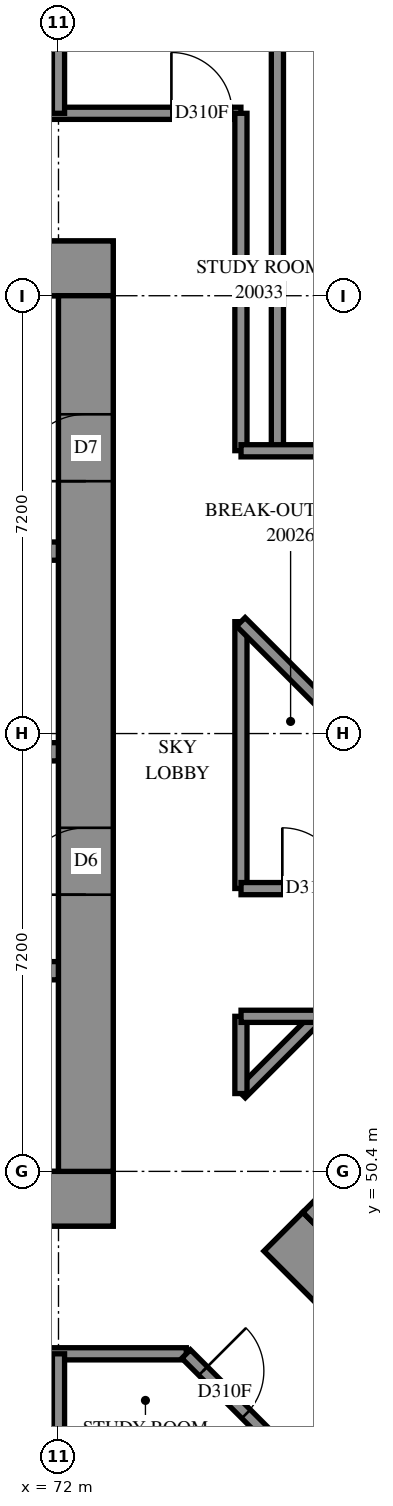
"""IFC4 building model, lengths in metres.
Left out: names, types, materials, properties, quantities, classifications, styles, units other than length and angle.
Written with IfcOpenShell. Run it as: python <this file> out.ifc"""

import sys

from ifc_helpers import new_model, si_unit, direction, frame, frame_2d, origin, place, context, subcontext, project, spatial, rectangle, extrude, element, fill, save


model = new_model("IFC4")
c1 = context("Model", 3, precision=1e-05, world=origin(), true_north=direction((0.0, 1.0)))
c2 = subcontext(c1, "Body", "Model", "MODEL_VIEW")
j1 = project(units=[si_unit("LENGTHUNIT", "METRE"), si_unit("PLANEANGLEUNIT", "RADIAN")], contexts=[c1])
p1 = place(None, origin())
s1 = spatial("IfcSite", under=j1, at=p1, CompositionType="ELEMENT")
p2 = place(p1, origin())
s2 = spatial("IfcBuilding", under=s1, at=p2, CompositionType="ELEMENT")
p3 = place(p2, frame((0.0, 0.0, 77.0)))
s3 = spatial("IfcBuildingStorey", under=s2, at=p3, CompositionType="ELEMENT", Elevation=77.0)
p4 = place(p3, frame((56.7, 49.95, -0.3), z_axis=(0.0, 0.0, 1.0), x_axis=(1.0, 0.0, 0.0)))
e1 = element("IfcWall", 1, at=p4, inside=s3, PredefinedType="SHEAR", context=c2, shape_type="SweptSolid", body=[
    extrude(rectangle(XDim=16.2, YDim=0.9, at=frame_2d((8.1, 0.0))), origin(), (0.0, 0.0, 1.0), 3.5),
])
p5 = place(p3, frame((56.7, 65.25, -0.3), z_axis=(0.0, 0.0, 1.0), x_axis=(1.0, 0.0, 0.0)))
e2 = element("IfcWall", 2, at=p5, inside=s3, PredefinedType="SHEAR", context=c2, shape_type="SweptSolid", body=[
    extrude(rectangle(XDim=16.2, YDim=0.9, at=frame_2d((8.1, 0.0))), origin(), (0.0, 0.0, 1.0), 3.5),
])
p6 = place(p5, frame((10.9, 0.0, 0.3)))
e3 = element("IfcOpeningElement", 3, at=p6, cuts=e2, PredefinedType="OPENING", context=c2, shape_type="SweptSolid", body=[
    extrude(rectangle(XDim=0.8, YDim=2.1, at=frame_2d((0.4, 1.05))), frame((0.0, 0.46, 0.0), z_axis=(0.0, -1.0, 0.0), x_axis=(1.0, 0.0, 0.0)), (0.0, 0.0, 1.0), 0.92),
])
p7 = place(p3, frame((72.45, 50.4, -0.3), z_axis=(0.0, 0.0, 1.0), x_axis=(0.0, 1.0, 0.0)))
e4 = element("IfcWall", 4, at=p7, inside=s3, PredefinedType="SHEAR", context=c2, shape_type="SweptSolid", body=[
    extrude(rectangle(XDim=14.4, YDim=0.9, at=frame_2d((7.2, 0.0))), origin(), (0.0, 0.0, 1.0), 3.5),
])
p8 = place(p7, frame((4.55, 0.0, 0.3)))
e5 = element("IfcOpeningElement", 5, at=p8, cuts=e4, PredefinedType="OPENING", context=c2, shape_type="SweptSolid", body=[
    extrude(rectangle(XDim=1.1, YDim=2.1, at=frame_2d((0.55, 1.05))), frame((0.0, 0.46, 0.0), z_axis=(0.0, -1.0, 0.0), x_axis=(1.0, 0.0, 0.0)), (0.0, 0.0, 1.0), 0.92),
])
p9 = place(p7, frame((11.35, 0.0, 0.3)))
e6 = element("IfcOpeningElement", 6, at=p9, cuts=e4, PredefinedType="OPENING", context=c2, shape_type="SweptSolid", body=[
    extrude(rectangle(XDim=1.1, YDim=2.1, at=frame_2d((0.55, 1.05))), frame((0.0, 0.46, 0.0), z_axis=(0.0, -1.0, 0.0), x_axis=(1.0, 0.0, 0.0)), (0.0, 0.0, 1.0), 0.92),
])
p10 = place(p3, frame((57.6, 53.7, 0.0), z_axis=(0.0, 0.0, 1.0), x_axis=(1.0, 0.0, 0.0)))
e7 = element("IfcWall", 7, at=p10, inside=s3, PredefinedType="SOLIDWALL", context=c2, shape_type="SweptSolid", body=[
    extrude(rectangle(XDim=14.4, YDim=0.3, at=frame_2d((7.2, 0.0))), origin(), (0.0, 0.0, 1.0), 3.9),
])
p11 = place(p10, frame((1.25, 0.0, 0.0)))
e8 = element("IfcOpeningElement", 8, at=p11, cuts=e7, PredefinedType="OPENING", context=c2, shape_type="SweptSolid", body=[
    extrude(rectangle(XDim=1.1, YDim=2.1, at=frame_2d((0.55, 1.05))), frame((0.0, 0.16, 0.0), z_axis=(0.0, -1.0, 0.0), x_axis=(1.0, 0.0, 0.0)), (0.0, 0.0, 1.0), 0.32),
])
p12 = place(p10, frame((4.85, 0.0, 0.0)))
e9 = element("IfcOpeningElement", 9, at=p12, cuts=e7, PredefinedType="OPENING", context=c2, shape_type="SweptSolid", body=[
    extrude(rectangle(XDim=1.1, YDim=2.1, at=frame_2d((0.55, 1.05))), frame((0.0, 0.16, 0.0), z_axis=(0.0, -1.0, 0.0), x_axis=(1.0, 0.0, 0.0)), (0.0, 0.0, 1.0), 0.32),
])
p13 = place(p10, frame((8.45, 0.0, 0.0)))
e10 = element("IfcOpeningElement", 10, at=p13, cuts=e7, PredefinedType="OPENING", context=c2, shape_type="SweptSolid", body=[
    extrude(rectangle(XDim=1.1, YDim=2.1, at=frame_2d((0.55, 1.05))), frame((0.0, 0.16, 0.0), z_axis=(0.0, -1.0, 0.0), x_axis=(1.0, 0.0, 0.0)), (0.0, 0.0, 1.0), 0.32),
])
p14 = place(p10, frame((12.05, 0.0, 0.0)))
e11 = element("IfcOpeningElement", 11, at=p14, cuts=e7, PredefinedType="OPENING", context=c2, shape_type="SweptSolid", body=[
    extrude(rectangle(XDim=1.1, YDim=2.1, at=frame_2d((0.55, 1.05))), frame((0.0, 0.16, 0.0), z_axis=(0.0, -1.0, 0.0), x_axis=(1.0, 0.0, 0.0)), (0.0, 0.0, 1.0), 0.32),
])
p15 = place(p3, frame((57.6, 57.3, 0.0), z_axis=(0.0, 0.0, 1.0), x_axis=(1.0, 0.0, 0.0)))
e12 = element("IfcWall", 12, at=p15, inside=s3, PredefinedType="SOLIDWALL", context=c2, shape_type="SweptSolid", body=[
    extrude(rectangle(XDim=14.4, YDim=0.3, at=frame_2d((7.2, 0.0))), origin(), (0.0, 0.0, 1.0), 3.9),
])
p16 = place(p15, frame((12.05, 0.0, 0.0)))
e13 = element("IfcOpeningElement", 13, at=p16, cuts=e12, PredefinedType="OPENING", context=c2, shape_type="SweptSolid", body=[
    extrude(rectangle(XDim=1.1, YDim=2.1, at=frame_2d((0.55, 1.05))), frame((0.0, 0.16, 0.0), z_axis=(0.0, -1.0, 0.0), x_axis=(1.0, 0.0, 0.0)), (0.0, 0.0, 1.0), 0.32),
])
p17 = place(p3, frame((64.8, 60.6, 0.0), z_axis=(0.0, 0.0, 1.0), x_axis=(1.0, 0.0, 0.0)))
e14 = element("IfcWall", 14, at=p17, inside=s3, PredefinedType="SOLIDWALL", context=c2, shape_type="SweptSolid", body=[
    extrude(rectangle(XDim=7.2, YDim=0.3, at=frame_2d((3.6, 0.0))), origin(), (0.0, 0.0, 1.0), 3.9),
])
p18 = place(p3, frame((75.7, 49.408, -0.3), z_axis=(0.0, 0.0, 1.0), x_axis=(0.7071098676, -0.7071036948, 0.0)))
e15 = element("IfcWall", 15, at=p18, inside=s3, PredefinedType="SHEAR", context=c2, shape_type="SweptSolid", body=[
    extrude(rectangle(XDim=16.2, YDim=0.9, at=frame_2d((8.1, 0.0))), origin(), (0.0, 0.0, 1.0), 3.5),
])
p19 = place(p3, frame((76.336, 49.408, -0.3), z_axis=(0.0, 0.0, 1.0), x_axis=(0.7071067812, 0.7071067812, 0.0)))
e16 = element("IfcWall", 16, at=p19, inside=s3, PredefinedType="SHEAR", context=c2, shape_type="SweptSolid", body=[
    extrude(rectangle(XDim=14.4, YDim=0.9, at=frame_2d((7.2, 0.0))), origin(), (0.0, 0.0, 1.0), 3.5),
])
p20 = place(p19, frame((4.55, 0.0, 0.3)))
e17 = element("IfcOpeningElement", 17, at=p20, cuts=e16, PredefinedType="OPENING", context=c2, shape_type="SweptSolid", body=[
    extrude(rectangle(XDim=1.1, YDim=2.1, at=frame_2d((0.55, 1.05))), frame((0.0, 0.46, 0.0), z_axis=(0.0, -1.0, 0.0), x_axis=(1.0, 0.0, 0.0)), (0.0, 0.0, 1.0), 0.92),
])
p21 = place(p19, frame((11.35, 0.0, 0.3)))
e18 = element("IfcOpeningElement", 18, at=p21, cuts=e16, PredefinedType="OPENING", context=c2, shape_type="SweptSolid", body=[
    extrude(rectangle(XDim=1.1, YDim=2.1, at=frame_2d((0.55, 1.05))), frame((0.0, 0.46, 0.0), z_axis=(0.0, -1.0, 0.0), x_axis=(1.0, 0.0, 0.0)), (0.0, 0.0, 1.0), 0.92),
])
p22 = place(p3, frame((79.28, 68.48, 0.0), z_axis=(0.0, 0.0, 1.0), x_axis=(-0.9122884657, 0.4095482333, 0.0)))
e19 = element("IfcWall", 19, at=p22, inside=s3, PredefinedType="SOLIDWALL", context=c2, shape_type="SweptSolid", body=[
    extrude(rectangle(XDim=3.464, YDim=0.8, at=frame_2d((1.732, 0.0))), origin(), (0.0, 0.0, 1.0), 0.65),
])
p23 = place(p3, frame((54.6, 67.8, 0.0), z_axis=(0.0, 0.0, 1.0), x_axis=(1.0, 0.0, 0.0)))
e20 = element("IfcWall", 20, at=p23, inside=s3, PredefinedType="PARTITIONING", context=c2, shape_type="SweptSolid", body=[
    extrude(rectangle(XDim=20.4, YDim=0.2, at=frame_2d((10.2, 0.0))), origin(), (0.0, 0.0, 1.0), 3.9),
])
p24 = place(p23, frame((19.257, 0.0, 0.0)))
e21 = element("IfcOpeningElement", 21, at=p24, cuts=e20, PredefinedType="OPENING", context=c2, shape_type="SweptSolid", body=[
    extrude(rectangle(XDim=1.0, YDim=2.1, at=frame_2d((0.5, 1.05))), frame((0.0, 0.11, 0.0), z_axis=(0.0, -1.0, 0.0), x_axis=(1.0, 0.0, 0.0)), (0.0, 0.0, 1.0), 0.22),
])
p25 = place(p23, frame((5.093, 0.0, 0.0)))
e22 = element("IfcOpeningElement", 22, at=p25, cuts=e20, PredefinedType="OPENING", context=c2, shape_type="SweptSolid", body=[
    extrude(rectangle(XDim=1.0, YDim=2.1, at=frame_2d((0.5, 1.05))), frame((0.0, 0.11, 0.0), z_axis=(0.0, -1.0, 0.0), x_axis=(1.0, 0.0, 0.0)), (0.0, 0.0, 1.0), 0.22),
])
p26 = place(p23, frame((7.168, 0.0, 0.0)))
e23 = element("IfcOpeningElement", 23, at=p26, cuts=e20, PredefinedType="OPENING", context=c2, shape_type="SweptSolid", body=[
    extrude(rectangle(XDim=1.0, YDim=2.1, at=frame_2d((0.5, 1.05))), frame((0.0, 0.11, 0.0), z_axis=(0.0, -1.0, 0.0), x_axis=(1.0, 0.0, 0.0)), (0.0, 0.0, 1.0), 0.22),
])
p27 = place(p23, frame((12.293, 0.0, 0.0)))
e24 = element("IfcOpeningElement", 24, at=p27, cuts=e20, PredefinedType="OPENING", context=c2, shape_type="SweptSolid", body=[
    extrude(rectangle(XDim=1.0, YDim=2.1, at=frame_2d((0.5, 1.05))), frame((0.0, 0.11, 0.0), z_axis=(0.0, -1.0, 0.0), x_axis=(1.0, 0.0, 0.0)), (0.0, 0.0, 1.0), 0.22),
])
p28 = place(p23, frame((14.367, 0.0, 0.0)))
e25 = element("IfcOpeningElement", 25, at=p28, cuts=e20, PredefinedType="OPENING", context=c2, shape_type="SweptSolid", body=[
    extrude(rectangle(XDim=1.0, YDim=2.1, at=frame_2d((0.5, 1.05))), frame((0.0, 0.11, 0.0), z_axis=(0.0, -1.0, 0.0), x_axis=(1.0, 0.0, 0.0)), (0.0, 0.0, 1.0), 0.22),
])
p29 = place(p3, frame((54.6, 47.4, 0.0), z_axis=(0.0, 0.0, 1.0), x_axis=(1.0, 0.0, 0.0)))
e26 = element("IfcWall", 26, at=p29, inside=s3, PredefinedType="PARTITIONING", context=c2, shape_type="SweptSolid", body=[
    extrude(rectangle(XDim=19.502, YDim=0.2, at=frame_2d((9.751, 0.0))), origin(), (0.0, 0.0, 1.0), 3.9),
])
p30 = place(p29, frame((5.032, 0.0, 0.0)))
e27 = element("IfcOpeningElement", 27, at=p30, cuts=e26, PredefinedType="OPENING", context=c2, shape_type="SweptSolid", body=[
    extrude(rectangle(XDim=1.0, YDim=2.1, at=frame_2d((0.5, 1.05))), frame((0.0, 0.11, 0.0), z_axis=(0.0, -1.0, 0.0), x_axis=(1.0, 0.0, 0.0)), (0.0, 0.0, 1.0), 0.22),
])
p31 = place(p29, frame((7.107, 0.0, 0.0)))
e28 = element("IfcOpeningElement", 28, at=p31, cuts=e26, PredefinedType="OPENING", context=c2, shape_type="SweptSolid", body=[
    extrude(rectangle(XDim=1.0, YDim=2.1, at=frame_2d((0.5, 1.05))), frame((0.0, 0.11, 0.0), z_axis=(0.0, -1.0, 0.0), x_axis=(1.0, 0.0, 0.0)), (0.0, 0.0, 1.0), 0.22),
])
p32 = place(p29, frame((12.232, 0.0, 0.0)))
e29 = element("IfcOpeningElement", 29, at=p32, cuts=e26, PredefinedType="OPENING", context=c2, shape_type="SweptSolid", body=[
    extrude(rectangle(XDim=1.0, YDim=2.1, at=frame_2d((0.5, 1.05))), frame((0.0, 0.11, 0.0), z_axis=(0.0, -1.0, 0.0), x_axis=(1.0, 0.0, 0.0)), (0.0, 0.0, 1.0), 0.22),
])
p33 = place(p29, frame((14.307, 0.0, 0.0)))
e30 = element("IfcOpeningElement", 30, at=p33, cuts=e26, PredefinedType="OPENING", context=c2, shape_type="SweptSolid", body=[
    extrude(rectangle(XDim=1.0, YDim=2.1, at=frame_2d((0.5, 1.05))), frame((0.0, 0.11, 0.0), z_axis=(0.0, -1.0, 0.0), x_axis=(1.0, 0.0, 0.0)), (0.0, 0.0, 1.0), 0.22),
])
p34 = place(p3, frame((75.6, 62.25, 0.0), z_axis=(0.0, 0.0, 1.0), x_axis=(0.0, 1.0, 0.0)))
e31 = element("IfcWall", 31, at=p34, inside=s3, PredefinedType="PARTITIONING", context=c2, shape_type="SweptSolid", body=[
    extrude(rectangle(XDim=8.42, YDim=0.2, at=frame_2d((4.21, 0.0))), origin(), (0.0, 0.0, 1.0), 3.9),
])
p35 = place(p3, frame((75.0, 62.252, 0.0), z_axis=(0.0, 0.0, 1.0), x_axis=(0.0, 1.0, 0.0)))
e32 = element("IfcWall", 32, at=p35, inside=s3, PredefinedType="PARTITIONING", context=c2, shape_type="SweptSolid", body=[
    extrude(rectangle(XDim=5.548, YDim=0.2, at=frame_2d((2.774, 0.0))), origin(), (0.0, 0.0, 1.0), 3.9),
])
p36 = place(p3, frame((75.0, 55.052, 0.0), z_axis=(0.0, 0.0, 1.0), x_axis=(0.0, 1.0, 0.0)))
e33 = element("IfcWall", 33, at=p36, inside=s3, PredefinedType="PARTITIONING", context=c2, shape_type="SweptSolid", body=[
    extrude(rectangle(XDim=4.388, YDim=0.2, at=frame_2d((2.194, 0.0))), origin(), (0.0, 0.0, 1.0), 3.9),
])
p37 = place(p3, frame((75.002, 62.25, 0.0), z_axis=(0.0, 0.0, 1.0), x_axis=(1.0, 0.0, 0.0)))
e34 = element("IfcWall", 34, at=p37, inside=s3, PredefinedType="PARTITIONING", context=c2, shape_type="SweptSolid", body=[
    extrude(rectangle(XDim=4.198, YDim=0.2, at=frame_2d((2.099, 0.0))), origin(), (0.0, 0.0, 1.0), 3.9),
])
p38 = place(p3, frame((74.099, 47.397, 0.0), z_axis=(0.0, 0.0, 1.0), x_axis=(0.7071067812, -0.7071067812, 0.0)))
e35 = element("IfcWall", 35, at=p38, inside=s3, PredefinedType="PARTITIONING", context=c2, shape_type="SweptSolid", body=[
    extrude(rectangle(XDim=4.059, YDim=0.2, at=frame_2d((2.029, 0.0))), origin(), (0.0, 0.0, 1.0), 3.9),
])
p39 = place(p38, frame((0.395, 0.0, 0.0)))
e36 = element("IfcOpeningElement", 36, at=p39, cuts=e35, PredefinedType="OPENING", context=c2, shape_type="SweptSolid", body=[
    extrude(rectangle(XDim=1.0, YDim=2.1, at=frame_2d((0.5, 1.05))), frame((0.0, 0.11, 0.0), z_axis=(0.0, -1.0, 0.0), x_axis=(1.0, 0.0, 0.0)), (0.0, 0.0, 1.0), 0.22),
])
p40 = place(p3, frame((75.002, 55.05, 0.0), z_axis=(0.0, 0.0, 1.0), x_axis=(1.0, 0.0, 0.0)))
e37 = element("IfcWall", 37, at=p40, inside=s3, PredefinedType="PARTITIONING", context=c2, shape_type="SweptSolid", body=[
    extrude(rectangle(XDim=3.37, YDim=0.2, at=frame_2d((1.685, 0.0))), origin(), (0.0, 0.0, 1.0), 3.9),
])
p41 = place(p40, frame((0.679, 0.0, 0.0)))
e38 = element("IfcOpeningElement", 38, at=p41, cuts=e37, PredefinedType="OPENING", context=c2, shape_type="SweptSolid", body=[
    extrude(rectangle(XDim=1.0, YDim=2.1, at=frame_2d((0.5, 1.05))), frame((0.0, 0.11, 0.0), z_axis=(0.0, -1.0, 0.0), x_axis=(1.0, 0.0, 0.0)), (0.0, 0.0, 1.0), 0.22),
])
p42 = place(p3, frame((74.999, 59.437, 0.0), z_axis=(0.0, 0.0, 1.0), x_axis=(0.7071067812, -0.7071067812, 0.0)))
e39 = element("IfcWall", 39, at=p42, inside=s3, PredefinedType="PARTITIONING", context=c2, shape_type="SweptSolid", body=[
    extrude(rectangle(XDim=3.321, YDim=0.2, at=frame_2d((1.66, 0.0))), origin(), (0.0, 0.0, 1.0), 3.9),
])
for number, where, z_axis, x_axis in (
    (40, (72.0, 67.8, 0.0), (0.0, 0.0, 1.0), (0.0, 1.0, 0.0)),
    (41, (72.0, 44.53, 0.0), (0.0, 0.0, 1.0), (0.0, 1.0, 0.0)),
):
    element("IfcWall", number, at=place(p3, frame(where, z_axis=z_axis, x_axis=x_axis)), inside=s3, PredefinedType="PARTITIONING", context=c2, shape_type="SweptSolid", body=[
        extrude(rectangle(XDim=2.87, YDim=0.2, at=frame_2d((1.435, 0.0))), origin(), (0.0, 0.0, 1.0), 3.9),
    ])
p43 = place(p3, frame((75.001, 51.681, 0.0), z_axis=(0.0, 0.0, 1.0), x_axis=(0.7071067812, 0.7071067812, 0.0)))
e42 = element("IfcWall", 42, at=p43, inside=s3, PredefinedType="PARTITIONING", context=c2, shape_type="SweptSolid", body=[
    extrude(rectangle(XDim=1.793, YDim=0.2, at=frame_2d((0.897, 0.0))), origin(), (0.0, 0.0, 1.0), 3.9),
])
p44 = place(p3, frame((75.0, 51.68, 0.0), z_axis=(0.0, 0.0, 1.0), x_axis=(0.0, 1.0, 0.0)))
e43 = element("IfcWall", 43, at=p44, inside=s3, PredefinedType="PARTITIONING", context=c2, shape_type="SweptSolid", body=[
    extrude(rectangle(XDim=1.27, YDim=0.2, at=frame_2d((0.635, 0.0))), origin(), (0.0, 0.0, 1.0), 3.9),
])
p45 = place(p3, frame((75.002, 52.95, 0.0), z_axis=(0.0, 0.0, 1.0), x_axis=(1.0, 0.0, 0.0)))
e44 = element("IfcWall", 44, at=p45, inside=s3, PredefinedType="PARTITIONING", context=c2, shape_type="SweptSolid", body=[
    extrude(rectangle(XDim=1.268, YDim=0.2, at=frame_2d((0.634, 0.0))), origin(), (0.0, 0.0, 1.0), 3.9),
])
p46 = place(p8, origin())
e45 = element("IfcDoor", 45, at=p46, inside=s3, OperationType="DOUBLE_DOOR_SINGLE_SWING", PredefinedType="DOOR", context=c2, shape_type="SweptSolid", body=[
    extrude(rectangle(XDim=1.1, YDim=2.1, at=frame_2d((0.55, 1.05))), frame((0.0, 0.025, 0.0), z_axis=(0.0, -1.0, 0.0), x_axis=(1.0, 0.0, 0.0)), (0.0, 0.0, 1.0), 0.05),
])
fill(e5, e45)
p47 = place(p9, origin())
e46 = element("IfcDoor", 46, at=p47, inside=s3, OperationType="SINGLE_SWING_RIGHT", PredefinedType="DOOR", context=c2, shape_type="SweptSolid", body=[
    extrude(rectangle(XDim=1.1, YDim=2.1, at=frame_2d((0.55, 1.05))), frame((0.0, 0.025, 0.0), z_axis=(0.0, -1.0, 0.0), x_axis=(1.0, 0.0, 0.0)), (0.0, 0.0, 1.0), 0.05),
])
fill(e6, e46)
p48 = place(p39, origin())
e47 = element("IfcDoor", 47, at=p48, inside=s3, OperationType="SINGLE_SWING_LEFT", PredefinedType="DOOR", context=c2, shape_type="SweptSolid", body=[
    extrude(rectangle(XDim=1.0, YDim=2.1, at=frame_2d((0.5, 1.05))), frame((0.0, 0.025, 0.0), z_axis=(0.0, -1.0, 0.0), x_axis=(1.0, 0.0, 0.0)), (0.0, 0.0, 1.0), 0.05),
])
fill(e36, e47)
p49 = place(p41, origin())
e48 = element("IfcDoor", 48, at=p49, inside=s3, OperationType="SINGLE_SWING_LEFT", PredefinedType="DOOR", context=c2, shape_type="SweptSolid", body=[
    extrude(rectangle(XDim=1.0, YDim=2.1, at=frame_2d((0.5, 1.05))), frame((0.0, 0.025, 0.0), z_axis=(0.0, -1.0, 0.0), x_axis=(1.0, 0.0, 0.0)), (0.0, 0.0, 1.0), 0.05),
])
fill(e38, e48)
p50 = place(p24, origin())
e49 = element("IfcDoor", 49, at=p50, inside=s3, OperationType="SINGLE_SWING_RIGHT", PredefinedType="DOOR", context=c2, shape_type="SweptSolid", body=[
    extrude(rectangle(XDim=1.0, YDim=2.1, at=frame_2d((0.5, 1.05))), frame((0.0, 0.025, 0.0), z_axis=(0.0, -1.0, 0.0), x_axis=(1.0, 0.0, 0.0)), (0.0, 0.0, 1.0), 0.05),
])
fill(e21, e49)
save(model, sys.argv[1])
